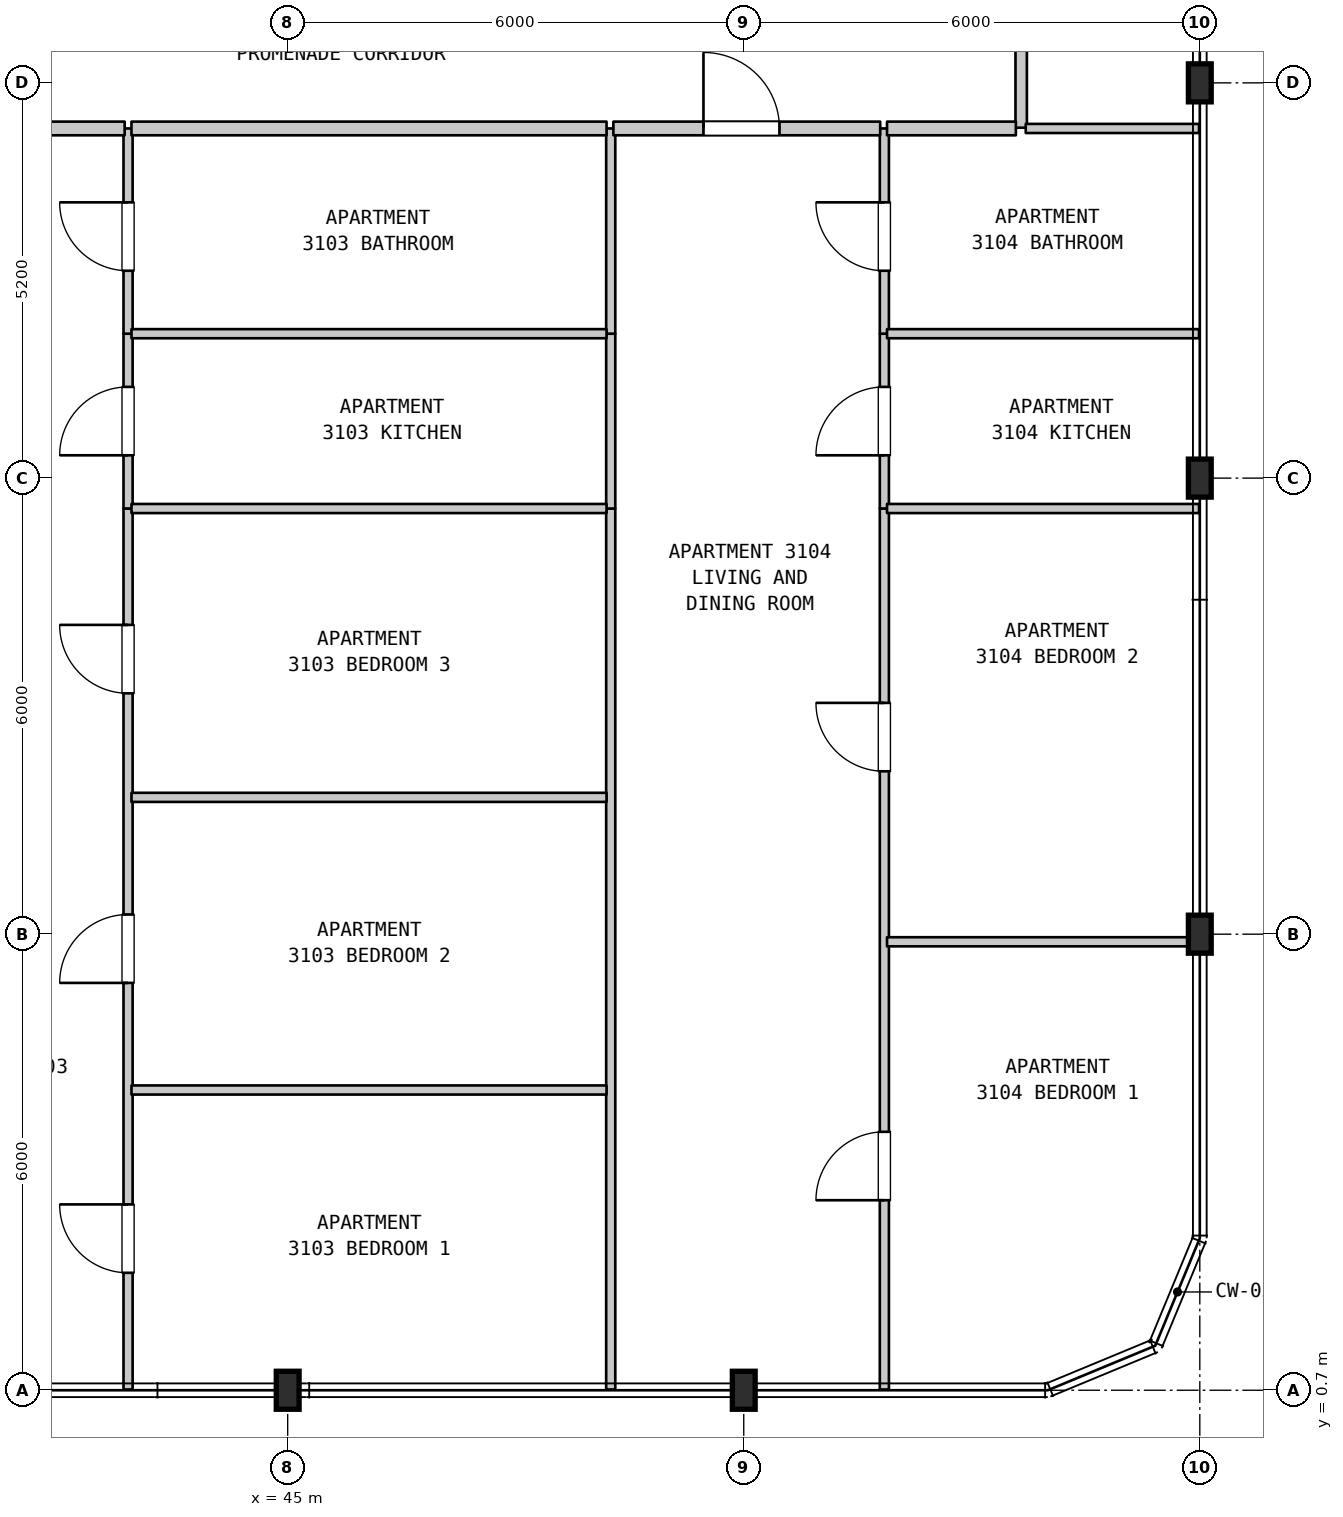
"""IFC4 building model, lengths in metres.
Left out: names, types, materials, properties, quantities, classifications, styles, units other than length and angle.
Written with IfcOpenShell. Run it as: python <this file> out.ifc"""

import sys

from ifc_helpers import new_model, si_unit, direction, frame, frame_2d, origin, origin_2d, place, context, subcontext, project, spatial, rectangle, i_section, extrude, element, fill, save


model = new_model("IFC4")
c1 = context("Model", 3, precision=1e-05, world=origin(), true_north=direction((0.0, 1.0)))
c2 = subcontext(c1, "Body", "Model", "MODEL_VIEW")
j1 = project(units=[si_unit("LENGTHUNIT", "METRE"), si_unit("PLANEANGLEUNIT", "RADIAN")], contexts=[c1])
p1 = place(None, origin())
s1 = spatial("IfcSite", under=j1, at=p1, CompositionType="ELEMENT")
p2 = place(p1, origin())
s2 = spatial("IfcBuilding", under=s1, at=p2, CompositionType="ELEMENT")
p3 = place(p2, frame((0.0, 0.0, 129.8)))
s3 = spatial("IfcBuildingStorey", under=s2, at=p3, CompositionType="ELEMENT", Elevation=129.8)
for number, where, z_axis, x_axis in (
    (1, (45.0, 0.7, 0.0), (0.0, 0.0, 1.0), (1.0, 0.0, 0.0)),
    (2, (51.0, 0.7, 0.0), (0.0, 0.0, 1.0), (1.0, 0.0, 0.0)),
    (3, (57.0, 6.7, 0.0), (0.0, 0.0, 1.0), (1.0, 0.0, 0.0)),
    (4, (57.0, 12.7, 0.0), (0.0, 0.0, 1.0), (1.0, 0.0, 0.0)),
    (5, (57.0, 17.9, 0.0), (0.0, 0.0, 1.0), (1.0, 0.0, 0.0)),
):
    element("IfcColumn", number, at=place(p3, frame(where, z_axis=z_axis, x_axis=x_axis)), inside=s3, PredefinedType="COLUMN", context=c2, shape_type="SweptSolid", body=[
        extrude(i_section(OverallWidth=0.3, OverallDepth=0.5, WebThickness=0.014, FlangeThickness=0.028, FilletRadius=0.027, at=origin_2d()), origin(), (0.0, 0.0, 1.0), 3.7),
    ])
p4 = place(p3, frame((42.9, 0.71, 0.0), z_axis=(0.0, 0.0, 1.0), x_axis=(0.0, 1.0, 0.0)))
e6 = element("IfcWall", 6, at=p4, inside=s3, PredefinedType="PARTITIONING", context=c2, shape_type="SweptSolid", body=[
    extrude(rectangle(XDim=11.59, YDim=0.12, at=frame_2d((5.795, 0.0))), origin(), (0.0, 0.0, 1.0), 3.385),
])
p5 = place(p4, frame((1.535, 0.0, 0.0)))
e7 = element("IfcOpeningElement", 7, at=p5, cuts=e6, PredefinedType="OPENING", context=c2, shape_type="SweptSolid", body=[
    extrude(rectangle(XDim=0.9, YDim=2.15, at=frame_2d((0.45, 1.075))), frame((0.0, 0.07, 0.0), z_axis=(0.0, -1.0, 0.0), x_axis=(1.0, 0.0, 0.0)), (0.0, 0.0, 1.0), 0.14),
])
p6 = place(p4, frame((5.349, 0.0, 0.0)))
e8 = element("IfcOpeningElement", 8, at=p6, cuts=e6, PredefinedType="OPENING", context=c2, shape_type="SweptSolid", body=[
    extrude(rectangle(XDim=0.9, YDim=2.15, at=frame_2d((0.45, 1.075))), frame((0.0, 0.07, 0.0), z_axis=(0.0, -1.0, 0.0), x_axis=(1.0, 0.0, 0.0)), (0.0, 0.0, 1.0), 0.14),
])
p7 = place(p4, frame((9.159, 0.0, 0.0)))
e9 = element("IfcOpeningElement", 9, at=p7, cuts=e6, PredefinedType="OPENING", context=c2, shape_type="SweptSolid", body=[
    extrude(rectangle(XDim=0.9, YDim=2.15, at=frame_2d((0.45, 1.075))), frame((0.0, 0.07, 0.0), z_axis=(0.0, -1.0, 0.0), x_axis=(1.0, 0.0, 0.0)), (0.0, 0.0, 1.0), 0.14),
])
p8 = place(p3, frame((42.9, 12.3, 0.0), z_axis=(0.0, 0.0, 1.0), x_axis=(0.0, 1.0, 0.0)))
e10 = element("IfcWall", 10, at=p8, inside=s3, PredefinedType="PARTITIONING", context=c2, shape_type="SweptSolid", body=[
    extrude(rectangle(XDim=2.3, YDim=0.12, at=frame_2d((1.15, 0.0))), origin(), (0.0, 0.0, 1.0), 3.385),
])
p9 = place(p8, frame((0.7, 0.0, 0.0)))
e11 = element("IfcOpeningElement", 11, at=p9, cuts=e10, PredefinedType="OPENING", context=c2, shape_type="SweptSolid", body=[
    extrude(rectangle(XDim=0.9, YDim=2.15, at=frame_2d((0.45, 1.075))), frame((0.0, 0.07, 0.0), z_axis=(0.0, -1.0, 0.0), x_axis=(1.0, 0.0, 0.0)), (0.0, 0.0, 1.0), 0.14),
])
p10 = place(p3, frame((42.9, 14.6, 0.0), z_axis=(0.0, 0.0, 1.0), x_axis=(0.0, 1.0, 0.0)))
e12 = element("IfcWall", 12, at=p10, inside=s3, PredefinedType="PARTITIONING", context=c2, shape_type="SweptSolid", body=[
    extrude(rectangle(XDim=2.7, YDim=0.12, at=frame_2d((1.35, 0.0))), origin(), (0.0, 0.0, 1.0), 3.385),
])
p11 = place(p10, frame((0.828, 0.0, 0.0)))
e13 = element("IfcOpeningElement", 13, at=p11, cuts=e12, PredefinedType="OPENING", context=c2, shape_type="SweptSolid", body=[
    extrude(rectangle(XDim=0.9, YDim=2.1, at=frame_2d((0.45, 1.05))), frame((0.0, 0.07, 0.0), z_axis=(0.0, -1.0, 0.0), x_axis=(1.0, 0.0, 0.0)), (0.0, 0.0, 1.0), 0.14),
])
p12 = place(p3, frame((49.25, 0.71, 0.0), z_axis=(0.0, 0.0, 1.0), x_axis=(0.0, 1.0, 0.0)))
e14 = element("IfcWall", 14, at=p12, inside=s3, PredefinedType="PARTITIONING", context=c2, shape_type="SweptSolid", body=[
    extrude(rectangle(XDim=11.59, YDim=0.12, at=frame_2d((5.795, 0.0))), origin(), (0.0, 0.0, 1.0), 3.385),
])
p13 = place(p3, frame((49.25, 12.3, 0.0), z_axis=(0.0, 0.0, 1.0), x_axis=(0.0, 1.0, 0.0)))
e15 = element("IfcWall", 15, at=p13, inside=s3, PredefinedType="PARTITIONING", context=c2, shape_type="SweptSolid", body=[
    extrude(rectangle(XDim=2.3, YDim=0.12, at=frame_2d((1.15, 0.0))), origin(), (0.0, 0.0, 1.0), 3.385),
])
p14 = place(p3, frame((49.25, 14.6, 0.0), z_axis=(0.0, 0.0, 1.0), x_axis=(0.0, 1.0, 0.0)))
e16 = element("IfcWall", 16, at=p14, inside=s3, PredefinedType="PARTITIONING", context=c2, shape_type="SweptSolid", body=[
    extrude(rectangle(XDim=2.7, YDim=0.12, at=frame_2d((1.35, 0.0))), origin(), (0.0, 0.0, 1.0), 3.385),
])
p15 = place(p3, frame((52.85, 0.71, 0.0), z_axis=(0.0, 0.0, 1.0), x_axis=(0.0, 1.0, 0.0)))
e17 = element("IfcWall", 17, at=p15, inside=s3, PredefinedType="PARTITIONING", context=c2, shape_type="SweptSolid", body=[
    extrude(rectangle(XDim=11.59, YDim=0.12, at=frame_2d((5.795, 0.0))), origin(), (0.0, 0.0, 1.0), 3.385),
])
p16 = place(p15, frame((2.49, 0.0, 0.0)))
e18 = element("IfcOpeningElement", 18, at=p16, cuts=e17, PredefinedType="OPENING", context=c2, shape_type="SweptSolid", body=[
    extrude(rectangle(XDim=0.9, YDim=2.15, at=frame_2d((0.45, 1.075))), frame((0.0, 0.07, 0.0), z_axis=(0.0, -1.0, 0.0), x_axis=(1.0, 0.0, 0.0)), (0.0, 0.0, 1.0), 0.14),
])
p17 = place(p15, frame((8.133, 0.0, 0.0)))
e19 = element("IfcOpeningElement", 19, at=p17, cuts=e17, PredefinedType="OPENING", context=c2, shape_type="SweptSolid", body=[
    extrude(rectangle(XDim=0.9, YDim=2.15, at=frame_2d((0.45, 1.075))), frame((0.0, 0.07, 0.0), z_axis=(0.0, -1.0, 0.0), x_axis=(1.0, 0.0, 0.0)), (0.0, 0.0, 1.0), 0.14),
])
p18 = place(p3, frame((52.85, 12.3, 0.0), z_axis=(0.0, 0.0, 1.0), x_axis=(0.0, 1.0, 0.0)))
e20 = element("IfcWall", 20, at=p18, inside=s3, PredefinedType="PARTITIONING", context=c2, shape_type="SweptSolid", body=[
    extrude(rectangle(XDim=2.3, YDim=0.12, at=frame_2d((1.15, 0.0))), origin(), (0.0, 0.0, 1.0), 3.385),
])
p19 = place(p18, frame((0.7, 0.0, 0.0)))
e21 = element("IfcOpeningElement", 21, at=p19, cuts=e20, PredefinedType="OPENING", context=c2, shape_type="SweptSolid", body=[
    extrude(rectangle(XDim=0.9, YDim=2.15, at=frame_2d((0.45, 1.075))), frame((0.0, 0.07, 0.0), z_axis=(0.0, -1.0, 0.0), x_axis=(1.0, 0.0, 0.0)), (0.0, 0.0, 1.0), 0.14),
])
p20 = place(p3, frame((52.85, 14.6, 0.0), z_axis=(0.0, 0.0, 1.0), x_axis=(0.0, 1.0, 0.0)))
e22 = element("IfcWall", 22, at=p20, inside=s3, PredefinedType="PARTITIONING", context=c2, shape_type="SweptSolid", body=[
    extrude(rectangle(XDim=2.7, YDim=0.12, at=frame_2d((1.35, 0.0))), origin(), (0.0, 0.0, 1.0), 3.385),
])
p21 = place(p20, frame((0.828, 0.0, 0.0)))
e23 = element("IfcOpeningElement", 23, at=p21, cuts=e22, PredefinedType="OPENING", context=c2, shape_type="SweptSolid", body=[
    extrude(rectangle(XDim=0.9, YDim=2.1, at=frame_2d((0.45, 1.05))), frame((0.0, 0.07, 0.0), z_axis=(0.0, -1.0, 0.0), x_axis=(1.0, 0.0, 0.0)), (0.0, 0.0, 1.0), 0.14),
])
p22 = place(p3, frame((54.65, 17.31, 0.0), z_axis=(0.0, 0.0, 1.0), x_axis=(0.0, 1.0, 0.0)))
e24 = element("IfcWall", 24, at=p22, inside=s3, PredefinedType="STANDARD", context=c2, shape_type="SweptSolid", body=[
    extrude(rectangle(XDim=2.19, YDim=0.15, at=frame_2d((1.095, 0.0))), origin(), (0.0, 0.0, 1.0), 3.385),
])
p23 = place(p3, frame((42.945, 4.65, 0.0), z_axis=(0.0, 0.0, 1.0), x_axis=(1.0, 0.0, 0.0)))
e25 = element("IfcWall", 25, at=p23, inside=s3, PredefinedType="PARTITIONING", context=c2, shape_type="SweptSolid", body=[
    extrude(rectangle(XDim=6.25, YDim=0.12, at=frame_2d((3.125, 0.0))), origin(), (0.0, 0.0, 1.0), 3.385),
])
p24 = place(p3, frame((52.885, 6.6, 0.0), z_axis=(0.0, 0.0, 1.0), x_axis=(1.0, 0.0, 0.0)))
e26 = element("IfcWall", 26, at=p24, inside=s3, PredefinedType="PARTITIONING", context=c2, shape_type="SweptSolid", body=[
    extrude(rectangle(XDim=4.105, YDim=0.12, at=frame_2d((2.052, 0.0))), origin(), (0.0, 0.0, 1.0), 2.785),
])
for number, where, z_axis, x_axis in (
    (27, (42.945, 8.5, 0.0), (0.0, 0.0, 1.0), (1.0, 0.0, 0.0)),
    (28, (42.945, 12.3, 0.0), (0.0, 0.0, 1.0), (1.0, 0.0, 0.0)),
):
    element("IfcWall", number, at=place(p3, frame(where, z_axis=z_axis, x_axis=x_axis)), inside=s3, PredefinedType="PARTITIONING", context=c2, shape_type="SweptSolid", body=[
        extrude(rectangle(XDim=6.25, YDim=0.12, at=frame_2d((3.125, 0.0))), origin(), (0.0, 0.0, 1.0), 3.385),
    ])
p25 = place(p3, frame((52.885, 12.3, 0.0), z_axis=(0.0, 0.0, 1.0), x_axis=(1.0, 0.0, 0.0)))
e29 = element("IfcWall", 29, at=p25, inside=s3, PredefinedType="PARTITIONING", context=c2, shape_type="SweptSolid", body=[
    extrude(rectangle(XDim=4.105, YDim=0.12, at=frame_2d((2.052, 0.0))), origin(), (0.0, 0.0, 1.0), 3.385),
])
p26 = place(p3, frame((42.945, 14.6, 0.0), z_axis=(0.0, 0.0, 1.0), x_axis=(1.0, 0.0, 0.0)))
e30 = element("IfcWall", 30, at=p26, inside=s3, PredefinedType="PARTITIONING", context=c2, shape_type="SweptSolid", body=[
    extrude(rectangle(XDim=6.25, YDim=0.12, at=frame_2d((3.125, 0.0))), origin(), (0.0, 0.0, 1.0), 3.385),
])
p27 = place(p3, frame((52.885, 14.6, 0.0), z_axis=(0.0, 0.0, 1.0), x_axis=(1.0, 0.0, 0.0)))
e31 = element("IfcWall", 31, at=p27, inside=s3, PredefinedType="PARTITIONING", context=c2, shape_type="SweptSolid", body=[
    extrude(rectangle(XDim=4.105, YDim=0.12, at=frame_2d((2.052, 0.0))), origin(), (0.0, 0.0, 1.0), 3.385),
])
p28 = place(p3, frame((38.895, 17.3, 0.0), z_axis=(0.0, 0.0, 1.0), x_axis=(1.0, 0.0, 0.0)))
e32 = element("IfcWall", 32, at=p28, inside=s3, PredefinedType="STANDARD", context=c2, shape_type="SweptSolid", body=[
    extrude(rectangle(XDim=3.96, YDim=0.18, at=frame_2d((1.98, 0.0))), origin(), (0.0, 0.0, 1.0), 3.385),
])
p29 = place(p28, frame((1.609, 0.0, 0.0)))
e33 = element("IfcOpeningElement", 33, at=p29, cuts=e32, PredefinedType="OPENING", context=c2, shape_type="SweptSolid", body=[
    extrude(rectangle(XDim=1.0, YDim=2.15, at=frame_2d((0.5, 1.075))), frame((0.0, 0.1, 0.0), z_axis=(0.0, -1.0, 0.0), x_axis=(1.0, 0.0, 0.0)), (0.0, 0.0, 1.0), 0.2),
])
p30 = place(p3, frame((42.945, 17.3, 0.0), z_axis=(0.0, 0.0, 1.0), x_axis=(1.0, 0.0, 0.0)))
e34 = element("IfcWall", 34, at=p30, inside=s3, PredefinedType="STANDARD", context=c2, shape_type="SweptSolid", body=[
    extrude(rectangle(XDim=6.25, YDim=0.18, at=frame_2d((3.125, 0.0))), origin(), (0.0, 0.0, 1.0), 3.385),
])
p31 = place(p3, frame((49.285, 17.3, 0.0), z_axis=(0.0, 0.0, 1.0), x_axis=(1.0, 0.0, 0.0)))
e35 = element("IfcWall", 35, at=p31, inside=s3, PredefinedType="STANDARD", context=c2, shape_type="SweptSolid", body=[
    extrude(rectangle(XDim=3.51, YDim=0.18, at=frame_2d((1.755, 0.0))), origin(), (0.0, 0.0, 1.0), 3.385),
])
p32 = place(p31, frame((1.185, 0.0, 0.0)))
e36 = element("IfcOpeningElement", 36, at=p32, cuts=e35, PredefinedType="OPENING", context=c2, shape_type="SweptSolid", body=[
    extrude(rectangle(XDim=1.0, YDim=2.15, at=frame_2d((0.5, 1.075))), frame((0.0, 0.1, 0.0), z_axis=(0.0, -1.0, 0.0), x_axis=(1.0, 0.0, 0.0)), (0.0, 0.0, 1.0), 0.2),
])
p33 = place(p3, frame((52.885, 17.3, 0.0), z_axis=(0.0, 0.0, 1.0), x_axis=(1.0, 0.0, 0.0)))
e37 = element("IfcWall", 37, at=p33, inside=s3, PredefinedType="STANDARD", context=c2, shape_type="SweptSolid", body=[
    extrude(rectangle(XDim=1.695, YDim=0.18, at=frame_2d((0.848, 0.0))), origin(), (0.0, 0.0, 1.0), 3.385),
])
p34 = place(p3, frame((54.71, 17.3, 0.0), z_axis=(0.0, 0.0, 1.0), x_axis=(1.0, 0.0, 0.0)))
e38 = element("IfcWall", 38, at=p34, inside=s3, PredefinedType="PARTITIONING", context=c2, shape_type="SweptSolid", body=[
    extrude(rectangle(XDim=2.28, YDim=0.12, at=frame_2d((1.14, 0.0))), origin(), (0.0, 0.0, 1.0), 3.385),
])
p35 = place(p5, origin())
e39 = element("IfcDoor", 39, at=p35, inside=s3, OperationType="SINGLE_SWING_RIGHT", PredefinedType="DOOR", context=c2, shape_type="SweptSolid", body=[
    extrude(rectangle(XDim=0.9, YDim=2.15, at=frame_2d((0.45, 1.075))), frame((0.0, 0.025, 0.0), z_axis=(0.0, -1.0, 0.0), x_axis=(1.0, 0.0, 0.0)), (0.0, 0.0, 1.0), 0.05),
])
fill(e7, e39)
p36 = place(p6, origin())
e40 = element("IfcDoor", 40, at=p36, inside=s3, OperationType="SINGLE_SWING_LEFT", PredefinedType="DOOR", context=c2, shape_type="SweptSolid", body=[
    extrude(rectangle(XDim=0.9, YDim=2.15, at=frame_2d((0.45, 1.075))), frame((0.0, 0.025, 0.0), z_axis=(0.0, -1.0, 0.0), x_axis=(1.0, 0.0, 0.0)), (0.0, 0.0, 1.0), 0.05),
])
fill(e8, e40)
p37 = place(p7, origin())
e41 = element("IfcDoor", 41, at=p37, inside=s3, OperationType="SINGLE_SWING_RIGHT", PredefinedType="DOOR", context=c2, shape_type="SweptSolid", body=[
    extrude(rectangle(XDim=0.9, YDim=2.15, at=frame_2d((0.45, 1.075))), frame((0.0, 0.025, 0.0), z_axis=(0.0, -1.0, 0.0), x_axis=(1.0, 0.0, 0.0)), (0.0, 0.0, 1.0), 0.05),
])
fill(e9, e41)
p38 = place(p9, origin())
e42 = element("IfcDoor", 42, at=p38, inside=s3, OperationType="SINGLE_SWING_LEFT", PredefinedType="DOOR", context=c2, shape_type="SweptSolid", body=[
    extrude(rectangle(XDim=0.9, YDim=2.15, at=frame_2d((0.45, 1.075))), frame((0.0, 0.025, 0.0), z_axis=(0.0, -1.0, 0.0), x_axis=(1.0, 0.0, 0.0)), (0.0, 0.0, 1.0), 0.05),
])
fill(e11, e42)
p39 = place(p11, origin())
e43 = element("IfcDoor", 43, at=p39, inside=s3, OperationType="SINGLE_SWING_RIGHT", PredefinedType="DOOR", context=c2, shape_type="SweptSolid", body=[
    extrude(rectangle(XDim=0.9, YDim=2.1, at=frame_2d((0.45, 1.05))), frame((0.0, 0.025, 0.0), z_axis=(0.0, -1.0, 0.0), x_axis=(1.0, 0.0, 0.0)), (0.0, 0.0, 1.0), 0.05),
])
fill(e13, e43)
p40 = place(p16, origin())
e44 = element("IfcDoor", 44, at=p40, inside=s3, OperationType="SINGLE_SWING_LEFT", PredefinedType="DOOR", context=c2, shape_type="SweptSolid", body=[
    extrude(rectangle(XDim=0.9, YDim=2.15, at=frame_2d((0.45, 1.075))), frame((0.0, 0.025, 0.0), z_axis=(0.0, -1.0, 0.0), x_axis=(1.0, 0.0, 0.0)), (0.0, 0.0, 1.0), 0.05),
])
fill(e18, e44)
p41 = place(p17, origin())
e45 = element("IfcDoor", 45, at=p41, inside=s3, OperationType="SINGLE_SWING_RIGHT", PredefinedType="DOOR", context=c2, shape_type="SweptSolid", body=[
    extrude(rectangle(XDim=0.9, YDim=2.15, at=frame_2d((0.45, 1.075))), frame((0.0, 0.025, 0.0), z_axis=(0.0, -1.0, 0.0), x_axis=(1.0, 0.0, 0.0)), (0.0, 0.0, 1.0), 0.05),
])
fill(e19, e45)
p42 = place(p19, origin())
e46 = element("IfcDoor", 46, at=p42, inside=s3, OperationType="SINGLE_SWING_LEFT", PredefinedType="DOOR", context=c2, shape_type="SweptSolid", body=[
    extrude(rectangle(XDim=0.9, YDim=2.15, at=frame_2d((0.45, 1.075))), frame((0.0, 0.025, 0.0), z_axis=(0.0, -1.0, 0.0), x_axis=(1.0, 0.0, 0.0)), (0.0, 0.0, 1.0), 0.05),
])
fill(e21, e46)
p43 = place(p21, origin())
e47 = element("IfcDoor", 47, at=p43, inside=s3, OperationType="SINGLE_SWING_RIGHT", PredefinedType="DOOR", context=c2, shape_type="SweptSolid", body=[
    extrude(rectangle(XDim=0.9, YDim=2.1, at=frame_2d((0.45, 1.05))), frame((0.0, 0.025, 0.0), z_axis=(0.0, -1.0, 0.0), x_axis=(1.0, 0.0, 0.0)), (0.0, 0.0, 1.0), 0.05),
])
fill(e23, e47)
p44 = place(p32, origin())
e48 = element("IfcDoor", 48, at=p44, inside=s3, OperationType="SINGLE_SWING_LEFT", PredefinedType="DOOR", context=c2, shape_type="SweptSolid", body=[
    extrude(rectangle(XDim=1.0, YDim=2.15, at=frame_2d((0.5, 1.075))), frame((0.0, 0.025, 0.0), z_axis=(0.0, -1.0, 0.0), x_axis=(1.0, 0.0, 0.0)), (0.0, 0.0, 1.0), 0.05),
])
fill(e36, e48)
save(model, sys.argv[1])
